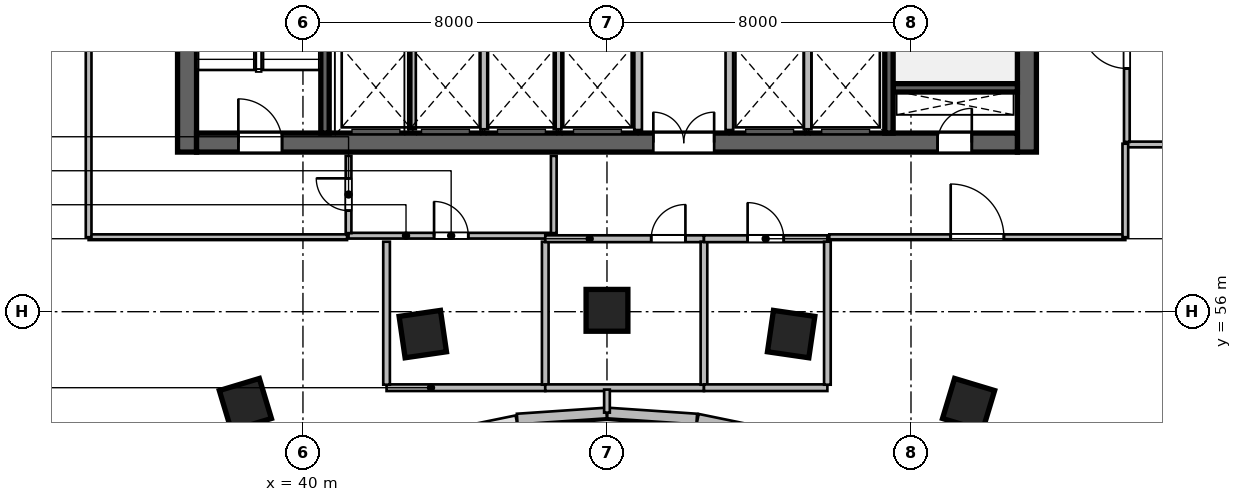
"""IFC4 building model, lengths in metres.
Left out: names, types, materials, properties, quantities, classifications, styles, units other than length and angle.
Written with IfcOpenShell. Run it as: python <this file> out.ifc"""

import sys

from ifc_helpers import new_model, si_unit, direction, frame, frame_2d, origin, origin_2d, place, context, subcontext, project, spatial, rectangle, extrude, source, transform, mapped, element, fill, save


model = new_model("IFC4")
c1 = context("Model", 3, precision=1e-05, world=origin(), true_north=direction((0.0, 1.0)))
c2 = subcontext(c1, "Body", "Model", "MODEL_VIEW")
j1 = project(units=[si_unit("LENGTHUNIT", "METRE"), si_unit("PLANEANGLEUNIT", "RADIAN")], contexts=[c1])
p1 = place(None, origin())
s1 = spatial("IfcSite", under=j1, at=p1, CompositionType="ELEMENT")
p2 = place(p1, origin())
s2 = spatial("IfcBuilding", under=s1, at=p2, CompositionType="ELEMENT")
p3 = place(p2, frame((0.0, 0.0, 91.2)))
s3 = spatial("IfcBuildingStorey", under=s2, at=p3, CompositionType="ELEMENT", Elevation=91.2)
m1 = source(origin(), c2, "Body", "SweptSolid", [
    extrude(rectangle(XDim=12.0, YDim=0.5, at=frame_2d((6.0, 0.0))), origin(), (0.0, 0.0, 1.0), 4.8),
])
for number, where, z_axis, x_axis in (
    (1, (36.95, 60.2, 0.0), (0.0, 0.0, 1.0), (0.0, 1.0, 0.0)),
    (2, (59.05, 60.2, 0.0), (0.0, 0.0, 1.0), (0.0, 1.0, 0.0)),
):
    element("IfcWall", number, at=place(p3, frame(where, z_axis=z_axis, x_axis=x_axis)), inside=s3, PredefinedType="SHEAR", context=c2, shape_type="MappedRepresentation", body=[
        mapped(m1, transform((0.0, 0.0, 0.0), scale=1.0)),
    ])
m2 = source(origin(), c2, "Body", "SweptSolid", [
    extrude(rectangle(XDim=21.6, YDim=0.5, at=frame_2d((10.8, 0.0))), origin(), (0.0, 0.0, 1.0), 4.8),
])
p4 = place(p3, frame((37.2, 60.45, 0.0), z_axis=(0.0, 0.0, 1.0), x_axis=(1.0, 0.0, 0.0)))
e3 = element("IfcWall", 3, at=p4, inside=s3, PredefinedType="SHEAR", context=c2, shape_type="MappedRepresentation", body=[
    mapped(m2, transform((0.0, 0.0, 0.0), scale=1.0)),
])
p5 = place(p4, frame((1.1, 0.0, 0.0)))
e4 = element("IfcOpeningElement", 4, at=p5, cuts=e3, PredefinedType="OPENING", context=c2, shape_type="SweptSolid", body=[
    extrude(rectangle(XDim=1.15, YDim=2.15, at=frame_2d((0.575, 1.075))), frame((0.0, 0.26, 0.0), z_axis=(0.0, -1.0, 0.0), x_axis=(1.0, 0.0, 0.0)), (0.0, 0.0, 1.0), 0.52),
])
p6 = place(p4, frame((19.5, 0.0, 0.0)))
e5 = element("IfcOpeningElement", 5, at=p6, cuts=e3, PredefinedType="OPENING", context=c2, shape_type="SweptSolid", body=[
    extrude(rectangle(XDim=0.9, YDim=2.1, at=frame_2d((0.45, 1.05))), frame((0.0, 0.26, 0.0), z_axis=(0.0, -1.0, 0.0), x_axis=(1.0, 0.0, 0.0)), (0.0, 0.0, 1.0), 0.52),
])
p7 = place(p4, frame((12.02, 0.0, 0.0)))
e6 = element("IfcOpeningElement", 6, at=p7, cuts=e3, PredefinedType="OPENING", context=c2, shape_type="SweptSolid", body=[
    extrude(rectangle(XDim=1.6, YDim=2.15, at=frame_2d((0.8, 1.075))), frame((0.0, 0.26, 0.0), z_axis=(0.0, -1.0, 0.0), x_axis=(1.0, 0.0, 0.0)), (0.0, 0.0, 1.0), 0.52),
])
m3 = source(origin(), c2, "Body", "SweptSolid", [
    extrude(rectangle(XDim=3.27, YDim=0.22, at=frame_2d((1.635, 0.0))), origin(), (0.0, 0.0, 1.0), 4.8),
])
p8 = place(p3, frame((55.53, 61.89, 0.0), z_axis=(0.0, 0.0, 1.0), x_axis=(1.0, 0.0, 0.0)))
e7 = element("IfcWall", 7, at=p8, inside=s3, PredefinedType="SHEAR", context=c2, shape_type="MappedRepresentation", body=[
    mapped(m3, transform((0.0, 0.0, 0.0), scale=1.0)),
])
m4 = source(origin(), c2, "Body", "SweptSolid", [
    extrude(rectangle(XDim=11.0, YDim=0.22, at=frame_2d((5.5, 0.0))), origin(), (0.0, 0.0, 1.0), 4.8),
])
p9 = place(p3, frame((40.58, 60.7, 0.0), z_axis=(0.0, 0.0, 1.0), x_axis=(0.0, 1.0, 0.0)))
e8 = element("IfcWall", 8, at=p9, inside=s3, PredefinedType="SHEAR", context=c2, shape_type="MappedRepresentation", body=[
    mapped(m4, transform((0.0, 0.0, 0.0), scale=1.0)),
])
p10 = place(p3, frame((55.42, 60.7, 0.0), z_axis=(0.0, 0.0, 1.0), x_axis=(0.0, 1.0, 0.0)))
e9 = element("IfcWall", 9, at=p10, inside=s3, PredefinedType="SHEAR", context=c2, shape_type="MappedRepresentation", body=[
    mapped(m4, transform((0.0, 0.0, 0.0), scale=1.0)),
])
p11 = place(p10, frame((9.545, 0.0, 0.0)))
e10 = element("IfcOpeningElement", 10, at=p11, cuts=e9, PredefinedType="OPENING", context=c2, shape_type="SweptSolid", body=[
    extrude(rectangle(XDim=1.15, YDim=2.15, at=frame_2d((0.575, 1.075))), frame((0.0, 0.12, 0.0), z_axis=(0.0, -1.0, 0.0), x_axis=(1.0, 0.0, 0.0)), (0.0, 0.0, 1.0), 0.24),
])
m5 = source(origin(), c2, "Body", "SweptSolid", [
    extrude(rectangle(XDim=1.1, YDim=1.1, at=origin_2d()), origin(), (0.0, 0.0, 1.0), 4.8),
])
for number, where, z_axis, x_axis in (
    (11, (38.485, 53.558, 0.0), (0.0, 0.0, 1.0), (-0.289, 0.957, 0.0)),
    (12, (43.154, 55.411, 0.0), (0.0, 0.0, 1.0), (-0.143, 0.99, 0.0)),
    (13, (48.0, 56.036, 0.0), (0.0, 0.0, 1.0), (0.0, 1.0, 0.0)),
    (14, (52.846, 55.411, 0.0), (0.0, 0.0, 1.0), (0.143, 0.99, 0.0)),
    (15, (57.515, 53.558, 0.0), (0.0, 0.0, 1.0), (0.289, 0.957, 0.0)),
):
    element("IfcColumn", number, at=place(p3, frame(where, z_axis=z_axis, x_axis=x_axis)), inside=s3, PredefinedType="COLUMN", context=c2, shape_type="MappedRepresentation", body=[
        mapped(m5, transform((0.0, 0.0, 0.0), scale=1.0)),
    ])
m6 = source(origin(), c2, "Body", "SweptSolid", [
    extrude(rectangle(XDim=2.374, YDim=0.28, at=frame_2d((1.187, 0.0))), origin(), (0.0, 0.0, 1.0), 4.55),
])
p12 = place(p3, frame((52.711, 52.695, 0.0), z_axis=(0.0, 0.0, 1.0), x_axis=(-0.979619827472, 0.200860632341, 0.0)))
e16 = element("IfcWall", 16, at=p12, inside=s3, PredefinedType="SOLIDWALL", context=c2, shape_type="MappedRepresentation", body=[
    mapped(m6, transform((0.0, 0.0, 0.0), scale=1.0)),
])
m7 = source(origin(), c2, "Body", "SweptSolid", [
    extrude(rectangle(XDim=2.355, YDim=0.28, at=frame_2d((1.177, 0.0))), origin(), (0.0, 0.0, 1.0), 4.55),
])
for number, where, z_axis, x_axis in (
    (17, (50.362, 53.175, 0.0), (0.0, 0.0, 1.0), (-0.998, 0.068, 0.0)),
    (18, (47.988, 53.335, 0.0), (0.0, 0.0, 1.0), (-0.998, -0.068, 0.0)),
):
    element("IfcWall", number, at=place(p3, frame(where, z_axis=z_axis, x_axis=x_axis)), inside=s3, PredefinedType="SOLIDWALL", context=c2, shape_type="MappedRepresentation", body=[
        mapped(m7, transform((0.0, 0.0, 0.0), scale=1.0)),
    ])
m8 = source(origin(), c2, "Body", "SweptSolid", [
    extrude(rectangle(XDim=2.24, YDim=0.2, at=frame_2d((1.12, 0.0))), origin(), (0.0, 0.0, 1.0), 4.55),
])
for number, where, z_axis, x_axis in (
    (19, (48.82, 60.78, 0.0), (0.0, 0.0, 1.0), (0.0, 1.0, 0.0)),
    (20, (51.22, 60.78, 0.0), (0.0, 0.0, 1.0), (0.0, 1.0, 0.0)),
):
    element("IfcWall", number, at=place(p3, frame(where, z_axis=z_axis, x_axis=x_axis)), inside=s3, PredefinedType="SOLIDWALL", context=c2, shape_type="MappedRepresentation", body=[
        mapped(m8, transform((0.0, 0.0, 0.0), scale=1.0)),
    ])
m9 = source(origin(), c2, "Body", "SweptSolid", [
    extrude(rectangle(XDim=2.2, YDim=0.2, at=frame_2d((1.1, 0.0))), origin(), (0.0, 0.0, 1.0), 4.55),
])
for number, where, z_axis, x_axis in (
    (21, (42.87, 60.8, 0.0), (0.0, 0.0, 1.0), (0.0, 1.0, 0.0)),
    (22, (44.77, 60.8, 0.0), (0.0, 0.0, 1.0), (0.0, 1.0, 0.0)),
    (23, (46.7, 60.8, 0.0), (0.0, 0.0, 1.0), (0.0, 1.0, 0.0)),
    (24, (53.28, 60.8, 0.0), (0.0, 0.0, 1.0), (0.0, 1.0, 0.0)),
):
    element("IfcWall", number, at=place(p3, frame(where, z_axis=z_axis, x_axis=x_axis)), inside=s3, PredefinedType="SOLIDWALL", context=c2, shape_type="MappedRepresentation", body=[
        mapped(m9, transform((0.0, 0.0, 0.0), scale=1.0)),
    ])
m10 = source(origin(), c2, "Body", "SweptSolid", [
    extrude(rectangle(XDim=5.4, YDim=0.15, at=frame_2d((2.7, 0.0))), origin(), (0.0, 0.0, 1.0), 4.117),
])
p13 = place(p3, frame((41.2, 58.0, 0.0), z_axis=(0.0, 0.0, 1.0), x_axis=(1.0, 0.0, 0.0)))
e25 = element("IfcWall", 25, at=p13, inside=s3, PredefinedType="PARTITIONING", context=c2, shape_type="MappedRepresentation", body=[
    mapped(m10, transform((0.0, 0.0, 0.0), scale=1.0)),
])
p14 = place(p13, frame((2.25, 0.0, 0.0)))
e26 = element("IfcOpeningElement", 26, at=p14, cuts=e25, PredefinedType="OPENING", context=c2, shape_type="SweptSolid", body=[
    extrude(rectangle(XDim=0.9, YDim=2.08, at=frame_2d((0.45, 1.04))), frame((0.0, 0.085, 0.0), z_axis=(0.0, -1.0, 0.0), x_axis=(1.0, 0.0, 0.0)), (0.0, 0.0, 1.0), 0.17),
])
m11 = source(origin(), c2, "Body", "SweptSolid", [
    extrude(rectangle(XDim=2.033, YDim=0.15, at=frame_2d((1.016, 0.0))), origin(), (0.0, 0.0, 1.0), 4.55),
])
p15 = place(p3, frame((41.2, 58.067, 0.0), z_axis=(0.0, 0.0, 1.0), x_axis=(0.0, 1.0, 0.0)))
e27 = element("IfcWall", 27, at=p15, inside=s3, PredefinedType="PARTITIONING", context=c2, shape_type="MappedRepresentation", body=[
    mapped(m11, transform((0.0, 0.0, 0.0), scale=1.0)),
])
p16 = place(p15, frame((0.591, 0.0, 0.0)))
e28 = element("IfcOpeningElement", 28, at=p16, cuts=e27, PredefinedType="OPENING", context=c2, shape_type="SweptSolid", body=[
    extrude(rectangle(XDim=0.85, YDim=2.1, at=frame_2d((0.425, 1.05))), frame((0.0, 0.085, 0.0), z_axis=(0.0, -1.0, 0.0), x_axis=(1.0, 0.0, 0.0)), (0.0, 0.0, 1.0), 0.17),
])
p17 = place(p3, frame((46.6, 58.067, 0.0), z_axis=(0.0, 0.0, 1.0), x_axis=(0.0, 1.0, 0.0)))
e29 = element("IfcWall", 29, at=p17, inside=s3, PredefinedType="PARTITIONING", context=c2, shape_type="MappedRepresentation", body=[
    mapped(m11, transform((0.0, 0.0, 0.0), scale=1.0)),
])
m12 = source(origin(), c2, "Body", "SweptSolid", [
    extrude(rectangle(XDim=4.176, YDim=0.175, at=frame_2d((2.088, 0.0))), origin(), (0.0, 0.0, 1.0), 4.55),
])
p18 = place(p3, frame((42.2, 54.0, 0.0), z_axis=(0.0, 0.0, 1.0), x_axis=(1.0, 0.0, 0.0)))
e30 = element("IfcWall", 30, at=p18, inside=s3, PredefinedType="PARTITIONING", context=c2, shape_type="MappedRepresentation", body=[
    mapped(m12, transform((0.0, 0.0, 0.0), scale=1.0)),
])
m13 = source(origin(), c2, "Body", "SweptSolid", [
    extrude(rectangle(XDim=3.763, YDim=0.175, at=frame_2d((1.881, 0.0))), origin(), (0.0, 0.0, 1.0), 4.55),
])
for number, where, z_axis, x_axis in (
    (31, (42.2, 54.079, 0.0), (0.0, 0.0, 1.0), (0.0, 1.0, 0.0)),
    (32, (46.376, 54.079, 0.0), (0.0, 0.0, 1.0), (0.0, 1.0, 0.0)),
):
    element("IfcWall", number, at=place(p3, frame(where, z_axis=z_axis, x_axis=x_axis)), inside=s3, PredefinedType="PARTITIONING", context=c2, shape_type="MappedRepresentation", body=[
        mapped(m13, transform((0.0, 0.0, 0.0), scale=1.0)),
    ])
p19 = place(p3, frame((46.376, 54.0, 0.0), z_axis=(0.0, 0.0, 1.0), x_axis=(1.0, 0.0, 0.0)))
e33 = element("IfcWall", 33, at=p19, inside=s3, PredefinedType="PARTITIONING", context=c2, shape_type="MappedRepresentation", body=[
    mapped(m12, transform((0.0, 0.0, 0.0), scale=1.0)),
])
m14 = source(origin(), c2, "Body", "SweptSolid", [
    extrude(rectangle(XDim=4.176, YDim=0.18, at=frame_2d((2.088, 0.0))), origin(), (0.0, 0.0, 1.0), 4.55),
])
p20 = place(p3, frame((46.376, 57.92, 0.0), z_axis=(0.0, 0.0, 1.0), x_axis=(1.0, 0.0, 0.0)))
e34 = element("IfcWall", 34, at=p20, inside=s3, PredefinedType="PLUMBINGWALL", context=c2, shape_type="MappedRepresentation", body=[
    mapped(m14, transform((0.0, 0.0, 0.0), scale=1.0)),
])
p21 = place(p20, frame((2.788, 0.0, 0.0)))
e35 = element("IfcOpeningElement", 35, at=p21, cuts=e34, PredefinedType="OPENING", context=c2, shape_type="SweptSolid", body=[
    extrude(rectangle(XDim=0.9, YDim=2.08, at=frame_2d((0.45, 1.04))), frame((0.0, 0.1, 0.0), z_axis=(0.0, -1.0, 0.0), x_axis=(1.0, 0.0, 0.0)), (0.0, 0.0, 1.0), 0.2),
])
p22 = place(p3, frame((50.552, 54.079, 0.0), z_axis=(0.0, 0.0, 1.0), x_axis=(0.0, 1.0, 0.0)))
e36 = element("IfcWall", 36, at=p22, inside=s3, PredefinedType="PARTITIONING", context=c2, shape_type="MappedRepresentation", body=[
    mapped(m13, transform((0.0, 0.0, 0.0), scale=1.0)),
])
m15 = source(origin(), c2, "Body", "SweptSolid", [
    extrude(rectangle(XDim=3.248, YDim=0.175, at=frame_2d((1.624, 0.0))), origin(), (0.0, 0.0, 1.0), 4.55),
])
p23 = place(p3, frame((50.552, 54.0, 0.0), z_axis=(0.0, 0.0, 1.0), x_axis=(1.0, 0.0, 0.0)))
e37 = element("IfcWall", 37, at=p23, inside=s3, PredefinedType="PARTITIONING", context=c2, shape_type="MappedRepresentation", body=[
    mapped(m15, transform((0.0, 0.0, 0.0), scale=1.0)),
])
m16 = source(origin(), c2, "Body", "SweptSolid", [
    extrude(rectangle(XDim=3.248, YDim=0.18, at=frame_2d((1.624, 0.0))), origin(), (0.0, 0.0, 1.0), 4.55),
])
p24 = place(p3, frame((50.552, 57.92, 0.0), z_axis=(0.0, 0.0, 1.0), x_axis=(1.0, 0.0, 0.0)))
e38 = element("IfcWall", 38, at=p24, inside=s3, PredefinedType="PLUMBINGWALL", context=c2, shape_type="MappedRepresentation", body=[
    mapped(m16, transform((0.0, 0.0, 0.0), scale=1.0)),
])
p25 = place(p24, frame((1.149, 0.0, 0.0)))
e39 = element("IfcOpeningElement", 39, at=p25, cuts=e38, PredefinedType="OPENING", context=c2, shape_type="SweptSolid", body=[
    extrude(rectangle(XDim=0.95, YDim=2.12, at=frame_2d((0.475, 1.06))), frame((0.0, 0.1, 0.0), z_axis=(0.0, -1.0, 0.0), x_axis=(1.0, 0.0, 0.0)), (0.0, 0.0, 1.0), 0.2),
])
p26 = place(p3, frame((53.8, 54.079, 0.0), z_axis=(0.0, 0.0, 1.0), x_axis=(0.0, 1.0, 0.0)))
e40 = element("IfcWall", 40, at=p26, inside=s3, PredefinedType="PARTITIONING", context=c2, shape_type="MappedRepresentation", body=[
    mapped(m13, transform((0.0, 0.0, 0.0), scale=1.0)),
])
m17 = source(origin(), c2, "Body", "SweptSolid", [
    extrude(rectangle(XDim=7.32, YDim=0.15, at=frame_2d((3.66, 0.0))), origin(), (0.0, 0.0, 1.0), 4.55),
])
p27 = place(p3, frame((61.68, 60.4, 0.0), z_axis=(0.0, 0.0, 1.0), x_axis=(1.0, 0.0, 0.0)))
e41 = element("IfcWall", 41, at=p27, inside=s3, PredefinedType="PARTITIONING", context=c2, shape_type="MappedRepresentation", body=[
    mapped(m17, transform((0.0, 0.0, 0.0), scale=1.0)),
])
m18 = source(origin(), c2, "Body", "SweptSolid", [
    extrude(rectangle(XDim=5.065, YDim=0.15, at=frame_2d((2.532, 0.0))), origin(), (0.0, 0.0, 1.0), 4.55),
])
p28 = place(p3, frame((61.68, 60.468, 0.0), z_axis=(0.0, 0.0, 1.0), x_axis=(0.0, 1.0, 0.0)))
e42 = element("IfcWall", 42, at=p28, inside=s3, PredefinedType="PARTITIONING", context=c2, shape_type="MappedRepresentation", body=[
    mapped(m18, transform((0.0, 0.0, 0.0), scale=1.0)),
])
p29 = place(p28, frame((1.933, 0.0, 0.0)))
e43 = element("IfcOpeningElement", 43, at=p29, cuts=e42, PredefinedType="OPENING", context=c2, shape_type="SweptSolid", body=[
    extrude(rectangle(XDim=1.2, YDim=2.15, at=frame_2d((0.6, 1.075))), frame((0.0, 0.085, 0.0), z_axis=(0.0, -1.0, 0.0), x_axis=(1.0, 0.0, 0.0)), (0.0, 0.0, 1.0), 0.17),
])
m19 = source(origin(), c2, "Body", "SweptSolid", [
    extrude(rectangle(XDim=0.605, YDim=0.15, at=frame_2d((0.303, 0.0))), origin(), (0.0, 0.0, 1.0), 4.55),
])
p30 = place(p3, frame((48.0, 53.344, 0.0), z_axis=(0.0, 0.0, 1.0), x_axis=(0.0, 1.0, 0.0)))
e44 = element("IfcWall", 44, at=p30, inside=s3, PredefinedType="PARTITIONING", context=c2, shape_type="MappedRepresentation", body=[
    mapped(m19, transform((0.0, 0.0, 0.0), scale=1.0)),
])
m20 = source(origin(), c2, "Body", "SweptSolid", [
    extrude(rectangle(XDim=6.8, YDim=0.15, at=frame_2d((3.4, 0.0))), origin(), (0.0, 0.0, 1.0), 4.55),
])
p31 = place(p3, frame((34.36, 57.96, 0.0), z_axis=(0.0, 0.0, 1.0), x_axis=(1.0, 0.0, 0.0)))
e45 = element("IfcWall", 45, at=p31, inside=s3, PredefinedType="PARTITIONING", context=c2, shape_type="MappedRepresentation", body=[
    mapped(m20, transform((0.0, 0.0, 0.0), scale=1.0)),
])
m21 = source(origin(), c2, "Body", "SweptSolid", [
    extrude(rectangle(XDim=18.067, YDim=0.15, at=frame_2d((9.034, 0.0))), origin(), (0.0, 0.0, 1.0), 4.55),
])
p32 = place(p3, frame((34.36, 57.96, 0.0), z_axis=(0.0, 0.0, 1.0), x_axis=(0.0, 1.0, 0.0)))
e46 = element("IfcWall", 46, at=p32, inside=s3, PredefinedType="PARTITIONING", context=c2, shape_type="MappedRepresentation", body=[
    mapped(m21, transform((0.0, 0.0, 0.0), scale=1.0)),
])
p33 = place(p32, frame((8.333, 0.0, 0.0)))
e47 = element("IfcOpeningElement", 47, at=p33, cuts=e46, PredefinedType="OPENING", context=c2, shape_type="SweptSolid", body=[
    extrude(rectangle(XDim=1.4, YDim=2.15, at=frame_2d((0.7, 1.075))), frame((0.0, 0.085, 0.0), z_axis=(0.0, -1.0, 0.0), x_axis=(1.0, 0.0, 0.0)), (0.0, 0.0, 1.0), 0.17),
])
m22 = source(origin(), c2, "Body", "SweptSolid", [
    extrude(rectangle(XDim=7.79, YDim=0.15, at=frame_2d((3.895, 0.0))), origin(), (0.0, 0.0, 1.0), 4.117),
])
p34 = place(p3, frame((53.85, 57.96, 0.0), z_axis=(0.0, 0.0, 1.0), x_axis=(1.0, 0.0, 0.0)))
e48 = element("IfcWall", 48, at=p34, inside=s3, PredefinedType="PARTITIONING", context=c2, shape_type="MappedRepresentation", body=[
    mapped(m22, transform((0.0, 0.0, 0.0), scale=1.0)),
])
p35 = place(p34, frame((3.195, 0.0, 0.0)))
e49 = element("IfcOpeningElement", 49, at=p35, cuts=e48, PredefinedType="OPENING", context=c2, shape_type="SweptSolid", body=[
    extrude(rectangle(XDim=1.4, YDim=2.15, at=frame_2d((0.7, 1.075))), frame((0.0, 0.085, 0.0), z_axis=(0.0, -1.0, 0.0), x_axis=(1.0, 0.0, 0.0)), (0.0, 0.0, 1.0), 0.17),
])
m23 = source(origin(), c2, "Body", "SweptSolid", [
    extrude(rectangle(XDim=2.46, YDim=0.15, at=frame_2d((1.23, 0.0))), origin(), (0.0, 0.0, 1.0), 4.55),
])
p36 = place(p3, frame((61.64, 57.96, 0.0), z_axis=(0.0, 0.0, 1.0), x_axis=(0.0, 1.0, 0.0)))
e50 = element("IfcWall", 50, at=p36, inside=s3, PredefinedType="PARTITIONING", context=c2, shape_type="MappedRepresentation", body=[
    mapped(m23, transform((0.0, 0.0, 0.0), scale=1.0)),
])
m24 = source(origin(), c2, "Body", "SweptSolid", [
    extrude(rectangle(XDim=1.15, YDim=2.15, at=frame_2d((0.575, 1.075))), frame((0.0, 0.025, 0.0), z_axis=(0.0, -1.0, 0.0), x_axis=(1.0, 0.0, 0.0)), (0.0, 0.0, 1.0), 0.05),
])
p37 = place(p5, origin())
e51 = element("IfcDoor", 51, at=p37, inside=s3, OperationType="SINGLE_SWING_LEFT", PredefinedType="DOOR", context=c2, shape_type="MappedRepresentation", body=[
    mapped(m24, transform((0.0, 0.0, 0.0), scale=1.0)),
])
fill(e4, e51)
m25 = source(origin(), c2, "Body", "SweptSolid", [
    extrude(rectangle(XDim=0.9, YDim=2.1, at=frame_2d((0.45, 1.05))), frame((0.0, 0.025, 0.0), z_axis=(0.0, -1.0, 0.0), x_axis=(1.0, 0.0, 0.0)), (0.0, 0.0, 1.0), 0.05),
])
p38 = place(p6, origin())
e52 = element("IfcDoor", 52, at=p38, inside=s3, OperationType="SINGLE_SWING_RIGHT", PredefinedType="DOOR", context=c2, shape_type="MappedRepresentation", body=[
    mapped(m25, transform((0.0, 0.0, 0.0), scale=1.0)),
])
fill(e5, e52)
m26 = source(origin(), c2, "Body", "SweptSolid", [
    extrude(rectangle(XDim=1.6, YDim=2.15, at=frame_2d((0.8, 1.075))), frame((0.0, 0.025, 0.0), z_axis=(0.0, -1.0, 0.0), x_axis=(1.0, 0.0, 0.0)), (0.0, 0.0, 1.0), 0.05),
])
p39 = place(p7, origin())
e53 = element("IfcDoor", 53, at=p39, inside=s3, OperationType="DOUBLE_DOOR_SINGLE_SWING", PredefinedType="DOOR", context=c2, shape_type="MappedRepresentation", body=[
    mapped(m26, transform((0.0, 0.0, 0.0), scale=1.0)),
])
fill(e6, e53)
m27 = source(origin(), c2, "Body", "SweptSolid", [
    extrude(rectangle(XDim=0.85, YDim=2.1, at=frame_2d((0.425, 1.05))), frame((0.0, 0.025, 0.0), z_axis=(0.0, -1.0, 0.0), x_axis=(1.0, 0.0, 0.0)), (0.0, 0.0, 1.0), 0.05),
])
p40 = place(p16, origin())
e54 = element("IfcDoor", 54, at=p40, inside=s3, OperationType="SINGLE_SWING_RIGHT", PredefinedType="DOOR", context=c2, shape_type="MappedRepresentation", body=[
    mapped(m27, transform((0.0, 0.0, 0.0), scale=1.0)),
])
fill(e28, e54)
m28 = source(origin(), c2, "Body", "SweptSolid", [
    extrude(rectangle(XDim=0.9, YDim=2.08, at=frame_2d((0.45, 1.04))), frame((0.0, 0.025, 0.0), z_axis=(0.0, -1.0, 0.0), x_axis=(1.0, 0.0, 0.0)), (0.0, 0.0, 1.0), 0.05),
])
p41 = place(p14, origin())
e55 = element("IfcDoor", 55, at=p41, inside=s3, OperationType="SINGLE_SWING_LEFT", PredefinedType="DOOR", context=c2, shape_type="MappedRepresentation", body=[
    mapped(m28, transform((0.0, 0.0, 0.0), scale=1.0)),
])
fill(e26, e55)
p42 = place(p21, origin())
e56 = element("IfcDoor", 56, at=p42, inside=s3, OperationType="SINGLE_SWING_RIGHT", PredefinedType="DOOR", context=c2, shape_type="MappedRepresentation", body=[
    mapped(m28, transform((0.0, 0.0, 0.0), scale=1.0)),
])
fill(e35, e56)
m29 = source(origin(), c2, "Body", "SweptSolid", [
    extrude(rectangle(XDim=0.95, YDim=2.12, at=frame_2d((0.475, 1.06))), frame((0.0, 0.025, 0.0), z_axis=(0.0, -1.0, 0.0), x_axis=(1.0, 0.0, 0.0)), (0.0, 0.0, 1.0), 0.05),
])
p43 = place(p25, origin())
e57 = element("IfcDoor", 57, at=p43, inside=s3, OperationType="SINGLE_SWING_LEFT", PredefinedType="DOOR", context=c2, shape_type="MappedRepresentation", body=[
    mapped(m29, transform((0.0, 0.0, 0.0), scale=1.0)),
])
fill(e39, e57)
m30 = source(origin(), c2, "Body", "SweptSolid", [
    extrude(rectangle(XDim=1.2, YDim=2.15, at=frame_2d((0.6, 1.075))), frame((0.0, 0.025, 0.0), z_axis=(0.0, -1.0, 0.0), x_axis=(1.0, 0.0, 0.0)), (0.0, 0.0, 1.0), 0.05),
])
p44 = place(p29, origin())
e58 = element("IfcDoor", 58, at=p44, inside=s3, OperationType="SINGLE_SWING_RIGHT", PredefinedType="DOOR", context=c2, shape_type="MappedRepresentation", body=[
    mapped(m30, transform((0.0, 0.0, 0.0), scale=1.0)),
])
fill(e43, e58)
m31 = source(origin(), c2, "Body", "SweptSolid", [
    extrude(rectangle(XDim=1.4, YDim=2.15, at=frame_2d((0.7, 1.075))), frame((0.0, 0.025, 0.0), z_axis=(0.0, -1.0, 0.0), x_axis=(1.0, 0.0, 0.0)), (0.0, 0.0, 1.0), 0.05),
])
p45 = place(p35, origin())
e59 = element("IfcDoor", 59, at=p45, inside=s3, OperationType="SINGLE_SWING_LEFT", PredefinedType="DOOR", context=c2, shape_type="MappedRepresentation", body=[
    mapped(m31, transform((0.0, 0.0, 0.0), scale=1.0)),
])
fill(e49, e59)
save(model, sys.argv[1])
